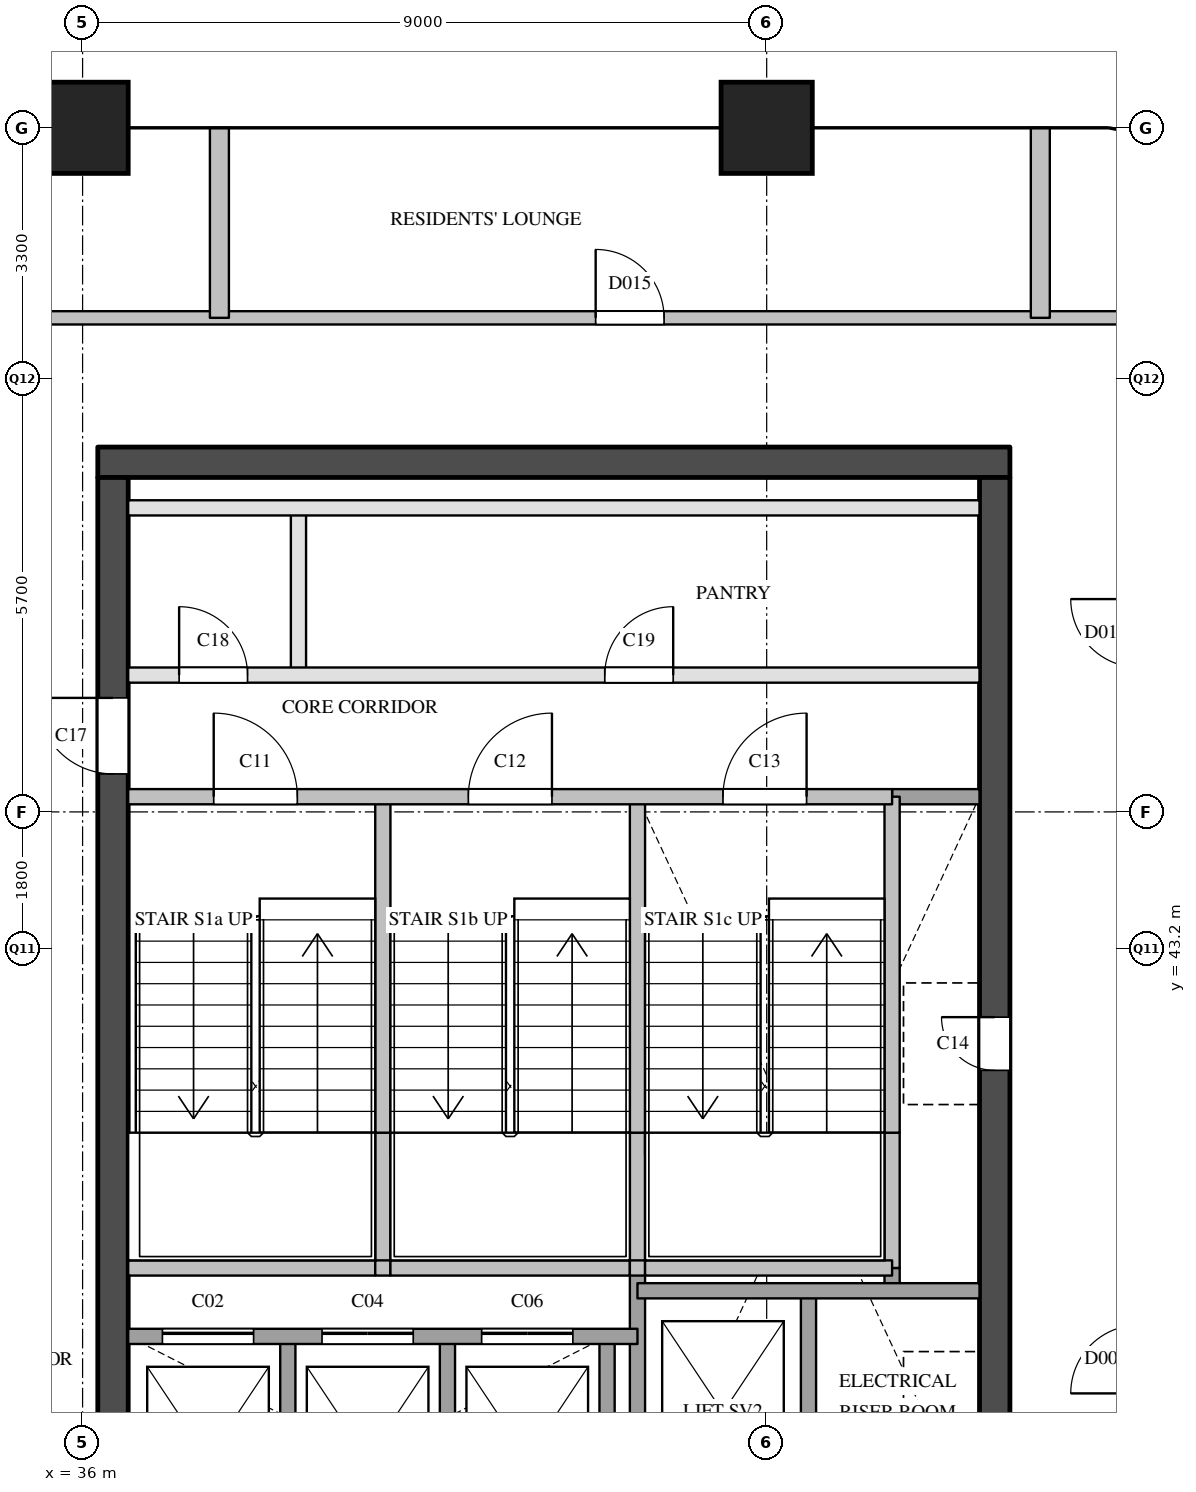
"""IFC4 building model, lengths in metres.
Left out: names, types, materials, properties, quantities, classifications, styles, units other than length and angle.
Written with IfcOpenShell. Run it as: python <this file> out.ifc"""

import sys

from ifc_helpers import new_model, si_unit, direction, frame, frame_2d, origin, origin_2d, place, context, subcontext, project, spatial, rectangle, extrude, element, fill, save


model = new_model("IFC4")
c1 = context("Model", 3, precision=1e-05, world=origin(), true_north=direction((0.0, 1.0)))
c2 = subcontext(c1, "Body", "Model", "MODEL_VIEW")
j1 = project(units=[si_unit("LENGTHUNIT", "METRE"), si_unit("PLANEANGLEUNIT", "RADIAN")], contexts=[c1])
p1 = place(None, origin())
s1 = spatial("IfcSite", under=j1, at=p1, CompositionType="ELEMENT")
p2 = place(p1, origin())
s2 = spatial("IfcBuilding", under=s1, at=p2, CompositionType="ELEMENT")
p3 = place(p2, frame((0.0, 0.0, 207.2)))
s3 = spatial("IfcBuildingStorey", under=s2, at=p3, CompositionType="ELEMENT", Elevation=207.2)
for number, where, z_axis, x_axis in (
    (1, (36.0, 54.0, 0.0), (0.0, 0.0, 1.0), (1.0, 0.0, 0.0)),
    (2, (45.0, 54.0, 0.0), (0.0, 0.0, 1.0), (1.0, 0.0, 0.0)),
):
    element("IfcColumn", number, at=place(p3, frame(where, z_axis=z_axis, x_axis=x_axis)), inside=s3, PredefinedType="COLUMN", context=c2, shape_type="SweptSolid", body=[
        extrude(rectangle(XDim=1.2, YDim=1.2, at=origin_2d()), origin(), (0.0, 0.0, 1.0), 3.9),
    ])
p4 = place(p3, frame((36.2, 49.6, 0.0), z_axis=(0.0, 0.0, 1.0), x_axis=(1.0, 0.0, 0.0)))
e3 = element("IfcWall", 3, at=p4, inside=s3, PredefinedType="SHEAR", context=c2, shape_type="SweptSolid", body=[
    extrude(rectangle(XDim=12.0, YDim=0.4, at=frame_2d((6.0, 0.0))), origin(), (0.0, 0.0, 1.0), 3.6),
])
p5 = place(p3, frame((36.4, 29.1, 0.0), z_axis=(0.0, 0.0, 1.0), x_axis=(0.0, 1.0, 0.0)))
e4 = element("IfcWall", 4, at=p5, inside=s3, PredefinedType="SHEAR", context=c2, shape_type="SweptSolid", body=[
    extrude(rectangle(XDim=20.3, YDim=0.4, at=frame_2d((10.15, 0.0))), origin(), (0.0, 0.0, 1.0), 3.6),
])
p6 = place(p5, frame((3.6, 0.0, 0.0)))
e5 = element("IfcOpeningElement", 5, at=p6, cuts=e4, PredefinedType="OPENING", context=c2, shape_type="SweptSolid", body=[
    extrude(rectangle(XDim=1.8, YDim=2.1, at=frame_2d((0.9, 1.05))), frame((0.0, 0.21, 0.0), z_axis=(0.0, -1.0, 0.0), x_axis=(1.0, 0.0, 0.0)), (0.0, 0.0, 1.0), 0.42),
])
p7 = place(p5, frame((16.4, 0.0, 0.0)))
e6 = element("IfcOpeningElement", 6, at=p7, cuts=e4, PredefinedType="OPENING", context=c2, shape_type="SweptSolid", body=[
    extrude(rectangle(XDim=1.0, YDim=2.1, at=frame_2d((0.5, 1.05))), frame((0.0, 0.21, 0.0), z_axis=(0.0, -1.0, 0.0), x_axis=(1.0, 0.0, 0.0)), (0.0, 0.0, 1.0), 0.42),
])
p8 = place(p3, frame((48.0, 29.1, 0.0), z_axis=(0.0, 0.0, 1.0), x_axis=(0.0, 1.0, 0.0)))
e7 = element("IfcWall", 7, at=p8, inside=s3, PredefinedType="SHEAR", context=c2, shape_type="SweptSolid", body=[
    extrude(rectangle(XDim=20.3, YDim=0.4, at=frame_2d((10.15, 0.0))), origin(), (0.0, 0.0, 1.0), 3.6),
])
p9 = place(p8, frame((12.5, 0.0, 0.0)))
e8 = element("IfcOpeningElement", 8, at=p9, cuts=e7, PredefinedType="OPENING", context=c2, shape_type="SweptSolid", body=[
    extrude(rectangle(XDim=0.7, YDim=2.1, at=frame_2d((0.35, 1.05))), frame((0.0, 0.21, 0.0), z_axis=(0.0, -1.0, 0.0), x_axis=(1.0, 0.0, 0.0)), (0.0, 0.0, 1.0), 0.42),
])
p10 = place(p8, frame((3.9, 0.0, 0.0)))
e9 = element("IfcOpeningElement", 9, at=p10, cuts=e7, PredefinedType="OPENING", context=c2, shape_type="SweptSolid", body=[
    extrude(rectangle(XDim=1.8, YDim=2.1, at=frame_2d((0.9, 1.05))), frame((0.0, 0.21, 0.0), z_axis=(0.0, -1.0, 0.0), x_axis=(1.0, 0.0, 0.0)), (0.0, 0.0, 1.0), 0.42),
])
p11 = place(p3, frame((38.7, 34.9, 0.0), z_axis=(0.0, 0.0, 1.0), x_axis=(0.0, 1.0, 0.0)))
e10 = element("IfcWall", 10, at=p11, inside=s3, PredefinedType="SOLIDWALL", context=c2, shape_type="SweptSolid", body=[
    extrude(rectangle(XDim=3.2, YDim=0.2, at=frame_2d((1.6, 0.0))), origin(), (0.0, 0.0, 1.0), 3.6),
])
p12 = place(p3, frame((38.84, 46.8, 0.0), z_axis=(0.0, 0.0, 1.0), x_axis=(0.0, 1.0, 0.0)))
e11 = element("IfcWall", 11, at=p12, inside=s3, PredefinedType="PARTITIONING", context=c2, shape_type="SweptSolid", body=[
    extrude(rectangle(XDim=2.2, YDim=0.2, at=frame_2d((1.1, 0.0))), origin(), (0.0, 0.0, 1.0), 3.6),
])
p13 = place(p3, frame((39.95, 39.0, 0.0), z_axis=(0.0, 0.0, 1.0), x_axis=(0.0, 1.0, 0.0)))
e12 = element("IfcWall", 12, at=p13, inside=s3, PredefinedType="SOLIDWALL", context=c2, shape_type="SweptSolid", body=[
    extrude(rectangle(XDim=1.78, YDim=0.2, at=frame_2d((0.89, 0.0))), origin(), (0.0, 0.0, 1.0), 3.6),
])
p14 = place(p3, frame((39.95, 40.78, 0.0), z_axis=(0.0, 0.0, 1.0), x_axis=(0.0, 1.0, 0.0)))
e13 = element("IfcWall", 13, at=p14, inside=s3, PredefinedType="SOLIDWALL", context=c2, shape_type="SweptSolid", body=[
    extrude(rectangle(XDim=4.42, YDim=0.2, at=frame_2d((2.21, 0.0))), origin(), (0.0, 0.0, 1.0), 3.6),
])
for number, where, z_axis, x_axis in (
    (14, (40.8, 34.9, 0.0), (0.0, 0.0, 1.0), (0.0, 1.0, 0.0)),
    (15, (42.9, 34.9, 0.0), (0.0, 0.0, 1.0), (0.0, 1.0, 0.0)),
):
    element("IfcWall", number, at=place(p3, frame(where, z_axis=z_axis, x_axis=x_axis)), inside=s3, PredefinedType="SOLIDWALL", context=c2, shape_type="SweptSolid", body=[
        extrude(rectangle(XDim=3.2, YDim=0.2, at=frame_2d((1.6, 0.0))), origin(), (0.0, 0.0, 1.0), 3.6),
    ])
p15 = place(p3, frame((43.3, 29.1, 0.0), z_axis=(0.0, 0.0, 1.0), x_axis=(0.0, 1.0, 0.0)))
e16 = element("IfcWall", 16, at=p15, inside=s3, PredefinedType="SOLIDWALL", context=c2, shape_type="SweptSolid", body=[
    extrude(rectangle(XDim=9.9, YDim=0.2, at=frame_2d((4.95, 0.0))), origin(), (0.0, 0.0, 1.0), 3.6),
])
p16 = place(p3, frame((43.3, 39.0, 0.0), z_axis=(0.0, 0.0, 1.0), x_axis=(0.0, 1.0, 0.0)))
e17 = element("IfcWall", 17, at=p16, inside=s3, PredefinedType="SOLIDWALL", context=c2, shape_type="SweptSolid", body=[
    extrude(rectangle(XDim=1.78, YDim=0.2, at=frame_2d((0.89, 0.0))), origin(), (0.0, 0.0, 1.0), 3.6),
])
p17 = place(p3, frame((43.3, 40.78, 0.0), z_axis=(0.0, 0.0, 1.0), x_axis=(0.0, 1.0, 0.0)))
e18 = element("IfcWall", 18, at=p17, inside=s3, PredefinedType="SOLIDWALL", context=c2, shape_type="SweptSolid", body=[
    extrude(rectangle(XDim=4.42, YDim=0.2, at=frame_2d((2.21, 0.0))), origin(), (0.0, 0.0, 1.0), 3.6),
])
p18 = place(p3, frame((45.55, 35.5, 0.0), z_axis=(0.0, 0.0, 1.0), x_axis=(0.0, 1.0, 0.0)))
e19 = element("IfcWall", 19, at=p18, inside=s3, PredefinedType="SOLIDWALL", context=c2, shape_type="SweptSolid", body=[
    extrude(rectangle(XDim=3.2, YDim=0.2, at=frame_2d((1.6, 0.0))), origin(), (0.0, 0.0, 1.0), 3.6),
])
p19 = place(p3, frame((46.65, 38.7, 0.0), z_axis=(0.0, 0.0, 1.0), x_axis=(0.0, 1.0, 0.0)))
e20 = element("IfcWall", 20, at=p19, inside=s3, PredefinedType="SOLIDWALL", context=c2, shape_type="SweptSolid", body=[
    extrude(rectangle(XDim=0.3, YDim=0.2, at=frame_2d((0.15, 0.0))), origin(), (0.0, 0.0, 1.0), 3.6),
])
p20 = place(p3, frame((46.65, 39.0, 0.0), z_axis=(0.0, 0.0, 1.0), x_axis=(0.0, 1.0, 0.0)))
e21 = element("IfcWall", 21, at=p20, inside=s3, PredefinedType="SOLIDWALL", context=c2, shape_type="SweptSolid", body=[
    extrude(rectangle(XDim=1.78, YDim=0.2, at=frame_2d((0.89, 0.0))), origin(), (0.0, 0.0, 1.0), 3.6),
])
p21 = place(p3, frame((46.65, 40.78, 0.0), z_axis=(0.0, 0.0, 1.0), x_axis=(0.0, 1.0, 0.0)))
e22 = element("IfcWall", 22, at=p21, inside=s3, PredefinedType="SOLIDWALL", context=c2, shape_type="SweptSolid", body=[
    extrude(rectangle(XDim=4.42, YDim=0.2, at=frame_2d((2.21, 0.0))), origin(), (0.0, 0.0, 1.0), 3.6),
])
p22 = place(p3, frame((36.6, 38.1, 0.0), z_axis=(0.0, 0.0, 1.0), x_axis=(1.0, 0.0, 0.0)))
e23 = element("IfcWall", 23, at=p22, inside=s3, PredefinedType="SOLIDWALL", context=c2, shape_type="SweptSolid", body=[
    extrude(rectangle(XDim=6.7, YDim=0.2, at=frame_2d((3.35, 0.0))), origin(), (0.0, 0.0, 1.0), 3.6),
])
p23 = place(p22, frame((0.45, 0.0, 0.0)))
e24 = element("IfcOpeningElement", 24, at=p23, cuts=e23, PredefinedType="OPENING", context=c2, shape_type="SweptSolid", body=[
    extrude(rectangle(XDim=1.2, YDim=2.1, at=frame_2d((0.6, 1.05))), frame((0.0, 0.11, 0.0), z_axis=(0.0, -1.0, 0.0), x_axis=(1.0, 0.0, 0.0)), (0.0, 0.0, 1.0), 0.22),
])
p24 = place(p22, frame((2.55, 0.0, 0.0)))
e25 = element("IfcOpeningElement", 25, at=p24, cuts=e23, PredefinedType="OPENING", context=c2, shape_type="SweptSolid", body=[
    extrude(rectangle(XDim=1.2, YDim=2.1, at=frame_2d((0.6, 1.05))), frame((0.0, 0.11, 0.0), z_axis=(0.0, -1.0, 0.0), x_axis=(1.0, 0.0, 0.0)), (0.0, 0.0, 1.0), 0.22),
])
p25 = place(p22, frame((4.65, 0.0, 0.0)))
e26 = element("IfcOpeningElement", 26, at=p25, cuts=e23, PredefinedType="OPENING", context=c2, shape_type="SweptSolid", body=[
    extrude(rectangle(XDim=1.2, YDim=2.1, at=frame_2d((0.6, 1.05))), frame((0.0, 0.11, 0.0), z_axis=(0.0, -1.0, 0.0), x_axis=(1.0, 0.0, 0.0)), (0.0, 0.0, 1.0), 0.22),
])
p26 = place(p3, frame((43.3, 38.7, 0.0), z_axis=(0.0, 0.0, 1.0), x_axis=(1.0, 0.0, 0.0)))
e27 = element("IfcWall", 27, at=p26, inside=s3, PredefinedType="SOLIDWALL", context=c2, shape_type="SweptSolid", body=[
    extrude(rectangle(XDim=4.5, YDim=0.2, at=frame_2d((2.25, 0.0))), origin(), (0.0, 0.0, 1.0), 3.6),
])
p27 = place(p3, frame((36.6, 39.0, 0.0), z_axis=(0.0, 0.0, 1.0), x_axis=(1.0, 0.0, 0.0)))
e28 = element("IfcWall", 28, at=p27, inside=s3, PredefinedType="SOLIDWALL", context=c2, shape_type="SweptSolid", body=[
    extrude(rectangle(XDim=3.25, YDim=0.2, at=frame_2d((1.625, 0.0))), origin(), (0.0, 0.0, 1.0), 3.6),
])
p28 = place(p3, frame((39.85, 39.0, 0.0), z_axis=(0.0, 0.0, 1.0), x_axis=(1.0, 0.0, 0.0)))
e29 = element("IfcWall", 29, at=p28, inside=s3, PredefinedType="SOLIDWALL", context=c2, shape_type="SweptSolid", body=[
    extrude(rectangle(XDim=0.2, YDim=0.2, at=frame_2d((0.1, 0.0))), origin(), (0.0, 0.0, 1.0), 3.6),
])
p29 = place(p3, frame((40.05, 39.0, 0.0), z_axis=(0.0, 0.0, 1.0), x_axis=(1.0, 0.0, 0.0)))
e30 = element("IfcWall", 30, at=p29, inside=s3, PredefinedType="SOLIDWALL", context=c2, shape_type="SweptSolid", body=[
    extrude(rectangle(XDim=3.15, YDim=0.2, at=frame_2d((1.575, 0.0))), origin(), (0.0, 0.0, 1.0), 3.6),
])
p30 = place(p3, frame((43.2, 39.0, 0.0), z_axis=(0.0, 0.0, 1.0), x_axis=(1.0, 0.0, 0.0)))
e31 = element("IfcWall", 31, at=p30, inside=s3, PredefinedType="SOLIDWALL", context=c2, shape_type="SweptSolid", body=[
    extrude(rectangle(XDim=0.2, YDim=0.2, at=frame_2d((0.1, 0.0))), origin(), (0.0, 0.0, 1.0), 3.6),
])
p31 = place(p3, frame((43.4, 39.0, 0.0), z_axis=(0.0, 0.0, 1.0), x_axis=(1.0, 0.0, 0.0)))
e32 = element("IfcWall", 32, at=p31, inside=s3, PredefinedType="SOLIDWALL", context=c2, shape_type="SweptSolid", body=[
    extrude(rectangle(XDim=3.25, YDim=0.2, at=frame_2d((1.625, 0.0))), origin(), (0.0, 0.0, 1.0), 3.6),
])
p32 = place(p3, frame((46.65, 45.2, 0.0), z_axis=(0.0, 0.0, 1.0), x_axis=(1.0, 0.0, 0.0)))
e33 = element("IfcWall", 33, at=p32, inside=s3, PredefinedType="SOLIDWALL", context=c2, shape_type="SweptSolid", body=[
    extrude(rectangle(XDim=1.15, YDim=0.2, at=frame_2d((0.575, 0.0))), origin(), (0.0, 0.0, 1.0), 3.6),
])
p33 = place(p3, frame((36.6, 45.2, 0.0), z_axis=(0.0, 0.0, 1.0), x_axis=(1.0, 0.0, 0.0)))
e34 = element("IfcWall", 34, at=p33, inside=s3, PredefinedType="SOLIDWALL", context=c2, shape_type="SweptSolid", body=[
    extrude(rectangle(XDim=10.05, YDim=0.2, at=frame_2d((5.025, 0.0))), origin(), (0.0, 0.0, 1.0), 3.6),
])
p34 = place(p33, frame((1.125, 0.0, 0.0)))
e35 = element("IfcOpeningElement", 35, at=p34, cuts=e34, PredefinedType="OPENING", context=c2, shape_type="SweptSolid", body=[
    extrude(rectangle(XDim=1.1, YDim=2.1, at=frame_2d((0.55, 1.05))), frame((0.0, 0.11, 0.0), z_axis=(0.0, -1.0, 0.0), x_axis=(1.0, 0.0, 0.0)), (0.0, 0.0, 1.0), 0.22),
])
p35 = place(p33, frame((4.475, 0.0, 0.0)))
e36 = element("IfcOpeningElement", 36, at=p35, cuts=e34, PredefinedType="OPENING", context=c2, shape_type="SweptSolid", body=[
    extrude(rectangle(XDim=1.1, YDim=2.1, at=frame_2d((0.55, 1.05))), frame((0.0, 0.11, 0.0), z_axis=(0.0, -1.0, 0.0), x_axis=(1.0, 0.0, 0.0)), (0.0, 0.0, 1.0), 0.22),
])
p36 = place(p33, frame((7.825, 0.0, 0.0)))
e37 = element("IfcOpeningElement", 37, at=p36, cuts=e34, PredefinedType="OPENING", context=c2, shape_type="SweptSolid", body=[
    extrude(rectangle(XDim=1.1, YDim=2.1, at=frame_2d((0.55, 1.05))), frame((0.0, 0.11, 0.0), z_axis=(0.0, -1.0, 0.0), x_axis=(1.0, 0.0, 0.0)), (0.0, 0.0, 1.0), 0.22),
])
p37 = place(p3, frame((36.6, 46.8, 0.0), z_axis=(0.0, 0.0, 1.0), x_axis=(1.0, 0.0, 0.0)))
e38 = element("IfcWall", 38, at=p37, inside=s3, PredefinedType="PARTITIONING", context=c2, shape_type="SweptSolid", body=[
    extrude(rectangle(XDim=11.2, YDim=0.2, at=frame_2d((5.6, 0.0))), origin(), (0.0, 0.0, 1.0), 3.6),
])
p38 = place(p37, frame((0.67, 0.0, 0.0)))
e39 = element("IfcOpeningElement", 39, at=p38, cuts=e38, PredefinedType="OPENING", context=c2, shape_type="SweptSolid", body=[
    extrude(rectangle(XDim=0.9, YDim=2.1, at=frame_2d((0.45, 1.05))), frame((0.0, 0.11, 0.0), z_axis=(0.0, -1.0, 0.0), x_axis=(1.0, 0.0, 0.0)), (0.0, 0.0, 1.0), 0.22),
])
p39 = place(p37, frame((6.27, 0.0, 0.0)))
e40 = element("IfcOpeningElement", 40, at=p39, cuts=e38, PredefinedType="OPENING", context=c2, shape_type="SweptSolid", body=[
    extrude(rectangle(XDim=0.9, YDim=2.1, at=frame_2d((0.45, 1.05))), frame((0.0, 0.11, 0.0), z_axis=(0.0, -1.0, 0.0), x_axis=(1.0, 0.0, 0.0)), (0.0, 0.0, 1.0), 0.22),
])
p40 = place(p3, frame((36.6, 49.0, 0.0), z_axis=(0.0, 0.0, 1.0), x_axis=(1.0, 0.0, 0.0)))
e41 = element("IfcWall", 41, at=p40, inside=s3, PredefinedType="PARTITIONING", context=c2, shape_type="SweptSolid", body=[
    extrude(rectangle(XDim=11.2, YDim=0.2, at=frame_2d((5.6, 0.0))), origin(), (0.0, 0.0, 1.0), 3.6),
])
p41 = place(p3, frame((34.5, 51.5, 0.0), z_axis=(0.0, 0.0, 1.0), x_axis=(1.0, 0.0, 0.0)))
e42 = element("IfcWall", 42, at=p41, inside=s3, PredefinedType="PARTITIONING", context=c2, shape_type="SweptSolid", body=[
    extrude(rectangle(XDim=15.4, YDim=0.175, at=frame_2d((7.7, 0.0))), origin(), (0.0, 0.0, 1.0), 3.6),
])
p42 = place(p41, frame((8.25, 0.0, 0.0)))
e43 = element("IfcOpeningElement", 43, at=p42, cuts=e42, PredefinedType="OPENING", context=c2, shape_type="SweptSolid", body=[
    extrude(rectangle(XDim=0.9, YDim=2.1, at=frame_2d((0.45, 1.05))), frame((0.0, 0.097, 0.0), z_axis=(0.0, -1.0, 0.0), x_axis=(1.0, 0.0, 0.0)), (0.0, 0.0, 1.0), 0.195),
])
for number, where, z_axis, x_axis in (
    (44, (37.8, 51.5, 0.0), (0.0, 0.0, 1.0), (0.0, 1.0, 0.0)),
    (45, (48.6, 51.5, 0.0), (0.0, 0.0, 1.0), (0.0, 1.0, 0.0)),
):
    element("IfcWall", number, at=place(p3, frame(where, z_axis=z_axis, x_axis=x_axis)), inside=s3, PredefinedType="PARTITIONING", context=c2, shape_type="SweptSolid", body=[
        extrude(rectangle(XDim=2.5, YDim=0.25, at=frame_2d((1.25, 0.0))), origin(), (0.0, 0.0, 1.0), 2.6),
    ])
p43 = place(p23, origin())
e46 = element("IfcDoor", 46, at=p43, inside=s3, OperationType="SLIDING_TO_LEFT", PredefinedType="DOOR", context=c2, shape_type="SweptSolid", body=[
    extrude(rectangle(XDim=1.2, YDim=2.1, at=frame_2d((0.6, 1.05))), frame((0.0, 0.025, 0.0), z_axis=(0.0, -1.0, 0.0), x_axis=(1.0, 0.0, 0.0)), (0.0, 0.0, 1.0), 0.05),
])
fill(e24, e46)
p44 = place(p24, origin())
e47 = element("IfcDoor", 47, at=p44, inside=s3, OperationType="SLIDING_TO_LEFT", PredefinedType="DOOR", context=c2, shape_type="SweptSolid", body=[
    extrude(rectangle(XDim=1.2, YDim=2.1, at=frame_2d((0.6, 1.05))), frame((0.0, 0.025, 0.0), z_axis=(0.0, -1.0, 0.0), x_axis=(1.0, 0.0, 0.0)), (0.0, 0.0, 1.0), 0.05),
])
fill(e25, e47)
p45 = place(p25, origin())
e48 = element("IfcDoor", 48, at=p45, inside=s3, OperationType="SLIDING_TO_LEFT", PredefinedType="DOOR", context=c2, shape_type="SweptSolid", body=[
    extrude(rectangle(XDim=1.2, YDim=2.1, at=frame_2d((0.6, 1.05))), frame((0.0, 0.025, 0.0), z_axis=(0.0, -1.0, 0.0), x_axis=(1.0, 0.0, 0.0)), (0.0, 0.0, 1.0), 0.05),
])
fill(e26, e48)
p46 = place(p34, origin())
e49 = element("IfcDoor", 49, at=p46, inside=s3, OperationType="SINGLE_SWING_LEFT", PredefinedType="DOOR", context=c2, shape_type="SweptSolid", body=[
    extrude(rectangle(XDim=1.1, YDim=2.1, at=frame_2d((0.55, 1.05))), frame((0.0, 0.025, 0.0), z_axis=(0.0, -1.0, 0.0), x_axis=(1.0, 0.0, 0.0)), (0.0, 0.0, 1.0), 0.05),
])
fill(e35, e49)
p47 = place(p35, origin())
e50 = element("IfcDoor", 50, at=p47, inside=s3, OperationType="SINGLE_SWING_RIGHT", PredefinedType="DOOR", context=c2, shape_type="SweptSolid", body=[
    extrude(rectangle(XDim=1.1, YDim=2.1, at=frame_2d((0.55, 1.05))), frame((0.0, 0.025, 0.0), z_axis=(0.0, -1.0, 0.0), x_axis=(1.0, 0.0, 0.0)), (0.0, 0.0, 1.0), 0.05),
])
fill(e36, e50)
p48 = place(p36, origin())
e51 = element("IfcDoor", 51, at=p48, inside=s3, OperationType="SINGLE_SWING_RIGHT", PredefinedType="DOOR", context=c2, shape_type="SweptSolid", body=[
    extrude(rectangle(XDim=1.1, YDim=2.1, at=frame_2d((0.55, 1.05))), frame((0.0, 0.025, 0.0), z_axis=(0.0, -1.0, 0.0), x_axis=(1.0, 0.0, 0.0)), (0.0, 0.0, 1.0), 0.05),
])
fill(e37, e51)
p49 = place(p9, origin())
e52 = element("IfcDoor", 52, at=p49, inside=s3, OperationType="SINGLE_SWING_RIGHT", PredefinedType="DOOR", context=c2, shape_type="SweptSolid", body=[
    extrude(rectangle(XDim=0.7, YDim=2.1, at=frame_2d((0.35, 1.05))), frame((0.0, 0.025, 0.0), z_axis=(0.0, -1.0, 0.0), x_axis=(1.0, 0.0, 0.0)), (0.0, 0.0, 1.0), 0.05),
])
fill(e8, e52)
p50 = place(p7, origin())
e53 = element("IfcDoor", 53, at=p50, inside=s3, OperationType="SINGLE_SWING_RIGHT", PredefinedType="DOOR", context=c2, shape_type="SweptSolid", body=[
    extrude(rectangle(XDim=1.0, YDim=2.1, at=frame_2d((0.5, 1.05))), frame((0.0, 0.025, 0.0), z_axis=(0.0, -1.0, 0.0), x_axis=(1.0, 0.0, 0.0)), (0.0, 0.0, 1.0), 0.05),
])
fill(e6, e53)
p51 = place(p38, origin())
e54 = element("IfcDoor", 54, at=p51, inside=s3, OperationType="SINGLE_SWING_LEFT", PredefinedType="DOOR", context=c2, shape_type="SweptSolid", body=[
    extrude(rectangle(XDim=0.9, YDim=2.1, at=frame_2d((0.45, 1.05))), frame((0.0, 0.025, 0.0), z_axis=(0.0, -1.0, 0.0), x_axis=(1.0, 0.0, 0.0)), (0.0, 0.0, 1.0), 0.05),
])
fill(e39, e54)
p52 = place(p39, origin())
e55 = element("IfcDoor", 55, at=p52, inside=s3, OperationType="SINGLE_SWING_RIGHT", PredefinedType="DOOR", context=c2, shape_type="SweptSolid", body=[
    extrude(rectangle(XDim=0.9, YDim=2.1, at=frame_2d((0.45, 1.05))), frame((0.0, 0.025, 0.0), z_axis=(0.0, -1.0, 0.0), x_axis=(1.0, 0.0, 0.0)), (0.0, 0.0, 1.0), 0.05),
])
fill(e40, e55)
p53 = place(p42, origin())
e56 = element("IfcDoor", 56, at=p53, inside=s3, OperationType="SINGLE_SWING_LEFT", PredefinedType="DOOR", context=c2, shape_type="SweptSolid", body=[
    extrude(rectangle(XDim=0.9, YDim=2.1, at=frame_2d((0.45, 1.05))), frame((0.0, 0.025, 0.0), z_axis=(0.0, -1.0, 0.0), x_axis=(1.0, 0.0, 0.0)), (0.0, 0.0, 1.0), 0.05),
])
fill(e43, e56)
save(model, sys.argv[1])
